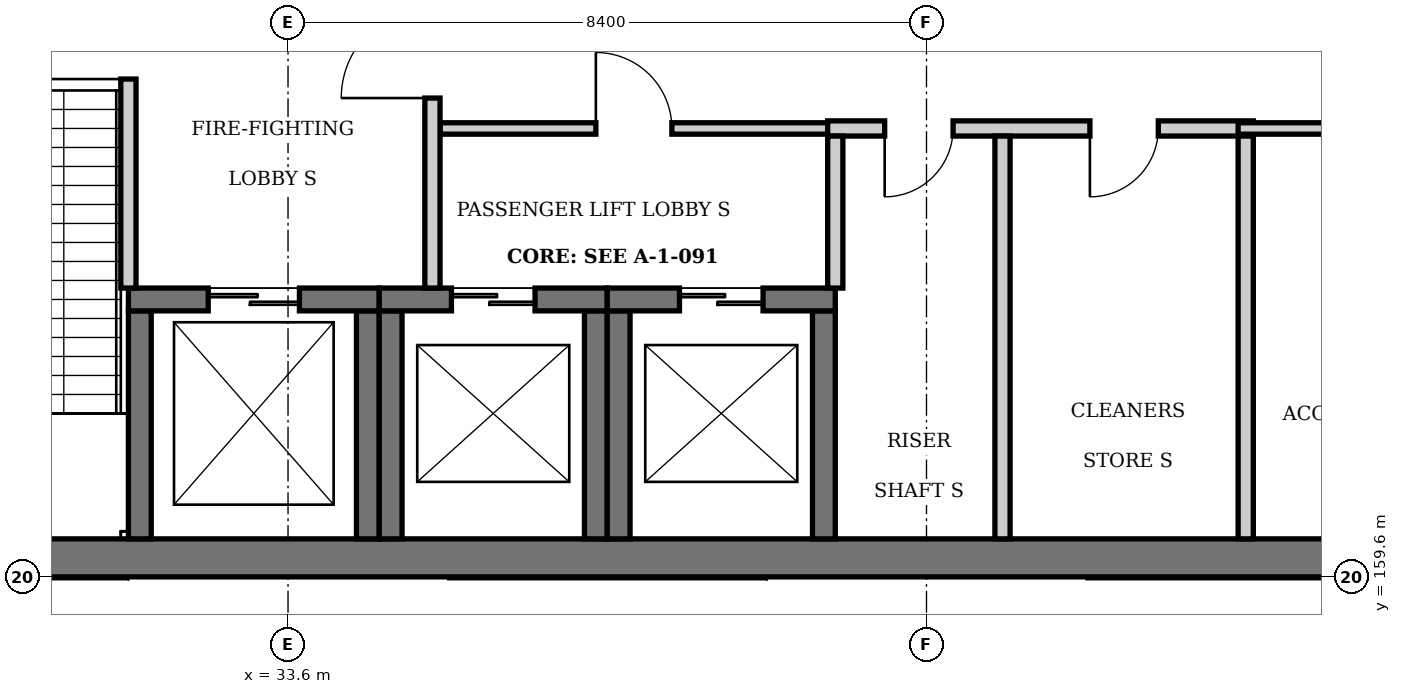
"""IFC4 building model, lengths in metres.
Left out: names, types, materials, properties, quantities, classifications, styles, units other than length and angle.
Written with IfcOpenShell. Run it as: python <this file> out.ifc"""

import sys

from ifc_helpers import new_model, si_unit, direction, frame, frame_2d, origin, place, context, subcontext, project, spatial, rectangle, extrude, element, fill, save


model = new_model("IFC4")
c1 = context("Model", 3, precision=1e-05, world=origin(), true_north=direction((0.0, 1.0)))
c2 = subcontext(c1, "Body", "Model", "MODEL_VIEW")
j1 = project(units=[si_unit("LENGTHUNIT", "METRE"), si_unit("PLANEANGLEUNIT", "RADIAN")], contexts=[c1])
p1 = place(None, origin())
s1 = spatial("IfcSite", under=j1, at=p1, CompositionType="ELEMENT")
p2 = place(p1, origin())
s2 = spatial("IfcBuilding", under=s1, at=p2, CompositionType="ELEMENT")
p3 = place(p2, origin())
s3 = spatial("IfcBuildingStorey", under=s2, at=p3, CompositionType="ELEMENT", Elevation=0.0)
p4 = place(p3, frame((25.35, 159.85, -0.7), z_axis=(0.0, 0.0, 1.0), x_axis=(1.0, 0.0, 0.0)))
e1 = element("IfcWall", 1, at=p4, inside=s3, PredefinedType="SHEAR", context=c2, shape_type="SweptSolid", body=[
    extrude(rectangle(XDim=25.043, YDim=0.5, at=frame_2d((12.521, 0.0))), origin(), (0.0, 0.0, 1.0), 6.7),
])
p5 = place(p4, frame((3.3, 0.0, 0.7)))
e2 = element("IfcOpeningElement", 2, at=p5, cuts=e1, PredefinedType="OPENING", context=c2, shape_type="SweptSolid", body=[
    extrude(rectangle(XDim=1.5, YDim=2.4, at=frame_2d((0.75, 1.2))), frame((0.0, 0.26, 0.0), z_axis=(0.0, -1.0, 0.0), x_axis=(1.0, 0.0, 0.0)), (0.0, 0.0, 1.0), 0.52),
])
for number, where, z_axis, x_axis in (
    (3, (34.65, 160.1, -1.8), (0.0, 0.0, 1.0), (0.0, 1.0, 0.0)),
    (4, (31.65, 160.1, -1.8), (0.0, 0.0, 1.0), (0.0, 1.0, 0.0)),
):
    element("IfcWall", number, at=place(p3, frame(where, z_axis=z_axis, x_axis=x_axis)), inside=s3, PredefinedType="SHEAR", context=c2, shape_type="SweptSolid", body=[
        extrude(rectangle(XDim=3.0, YDim=0.3, at=frame_2d((1.5, 0.0))), origin(), (0.0, 0.0, 1.0), 7.8),
    ])
p6 = place(p3, frame((31.5, 163.25, -1.8), z_axis=(0.0, 0.0, 1.0), x_axis=(1.0, 0.0, 0.0)))
e5 = element("IfcWall", 5, at=p6, inside=s3, PredefinedType="SHEAR", context=c2, shape_type="SweptSolid", body=[
    extrude(rectangle(XDim=3.3, YDim=0.3, at=frame_2d((1.65, 0.0))), origin(), (0.0, 0.0, 1.0), 7.8),
])
p7 = place(p6, frame((1.05, 0.0, 1.8)))
e6 = element("IfcOpeningElement", 6, at=p7, cuts=e5, PredefinedType="OPENING", context=c2, shape_type="SweptSolid", body=[
    extrude(rectangle(XDim=1.2, YDim=2.1, at=frame_2d((0.6, 1.05))), frame((0.0, 0.16, 0.0), z_axis=(0.0, -1.0, 0.0), x_axis=(1.0, 0.0, 0.0)), (0.0, 0.0, 1.0), 0.32),
])
for number, where, z_axis, x_axis in (
    (7, (37.65, 160.1, -1.8), (0.0, 0.0, 1.0), (0.0, 1.0, 0.0)),
    (8, (34.95, 160.1, -1.8), (0.0, 0.0, 1.0), (0.0, 1.0, 0.0)),
):
    element("IfcWall", number, at=place(p3, frame(where, z_axis=z_axis, x_axis=x_axis)), inside=s3, PredefinedType="SHEAR", context=c2, shape_type="SweptSolid", body=[
        extrude(rectangle(XDim=3.0, YDim=0.3, at=frame_2d((1.5, 0.0))), origin(), (0.0, 0.0, 1.0), 7.8),
    ])
p8 = place(p3, frame((34.8, 163.25, -1.8), z_axis=(0.0, 0.0, 1.0), x_axis=(1.0, 0.0, 0.0)))
e9 = element("IfcWall", 9, at=p8, inside=s3, PredefinedType="SHEAR", context=c2, shape_type="SweptSolid", body=[
    extrude(rectangle(XDim=3.0, YDim=0.3, at=frame_2d((1.5, 0.0))), origin(), (0.0, 0.0, 1.0), 7.8),
])
p9 = place(p8, frame((0.95, 0.0, 1.8)))
e10 = element("IfcOpeningElement", 10, at=p9, cuts=e9, PredefinedType="OPENING", context=c2, shape_type="SweptSolid", body=[
    extrude(rectangle(XDim=1.1, YDim=2.1, at=frame_2d((0.55, 1.05))), frame((0.0, 0.16, 0.0), z_axis=(0.0, -1.0, 0.0), x_axis=(1.0, 0.0, 0.0)), (0.0, 0.0, 1.0), 0.32),
])
for number, where, z_axis, x_axis in (
    (11, (40.65, 160.1, -1.8), (0.0, 0.0, 1.0), (0.0, 1.0, 0.0)),
    (12, (37.95, 160.1, -1.8), (0.0, 0.0, 1.0), (0.0, 1.0, 0.0)),
):
    element("IfcWall", number, at=place(p3, frame(where, z_axis=z_axis, x_axis=x_axis)), inside=s3, PredefinedType="SHEAR", context=c2, shape_type="SweptSolid", body=[
        extrude(rectangle(XDim=3.0, YDim=0.3, at=frame_2d((1.5, 0.0))), origin(), (0.0, 0.0, 1.0), 7.8),
    ])
p10 = place(p3, frame((37.8, 163.25, -1.8), z_axis=(0.0, 0.0, 1.0), x_axis=(1.0, 0.0, 0.0)))
e13 = element("IfcWall", 13, at=p10, inside=s3, PredefinedType="SHEAR", context=c2, shape_type="SweptSolid", body=[
    extrude(rectangle(XDim=3.0, YDim=0.3, at=frame_2d((1.5, 0.0))), origin(), (0.0, 0.0, 1.0), 7.8),
])
p11 = place(p10, frame((0.95, 0.0, 1.8)))
e14 = element("IfcOpeningElement", 14, at=p11, cuts=e13, PredefinedType="OPENING", context=c2, shape_type="SweptSolid", body=[
    extrude(rectangle(XDim=1.1, YDim=2.1, at=frame_2d((0.55, 1.05))), frame((0.0, 0.16, 0.0), z_axis=(0.0, -1.0, 0.0), x_axis=(1.0, 0.0, 0.0)), (0.0, 0.0, 1.0), 0.32),
])
p12 = place(p3, frame((35.6, 165.5, 0.0), z_axis=(0.0, 0.0, 1.0), x_axis=(1.0, 0.0, 0.0)))
e15 = element("IfcWall", 15, at=p12, inside=s3, PredefinedType="PARTITIONING", context=c2, shape_type="SweptSolid", body=[
    extrude(rectangle(XDim=5.3, YDim=0.15, at=frame_2d((2.65, 0.0))), origin(), (0.0, 0.0, 1.0), 5.8),
])
p13 = place(p12, frame((2.05, 0.0, 0.0)))
e16 = element("IfcOpeningElement", 16, at=p13, cuts=e15, PredefinedType="OPENING", context=c2, shape_type="SweptSolid", body=[
    extrude(rectangle(XDim=1.0, YDim=2.1, at=frame_2d((0.5, 1.05))), frame((0.0, 0.085, 0.0), z_axis=(0.0, -1.0, 0.0), x_axis=(1.0, 0.0, 0.0)), (0.0, 0.0, 1.0), 0.17),
])
p14 = place(p3, frame((40.7, 165.5, 0.0), z_axis=(0.0, 0.0, 1.0), x_axis=(1.0, 0.0, 0.0)))
e17 = element("IfcWall", 17, at=p14, inside=s3, PredefinedType="PARTITIONING", context=c2, shape_type="SweptSolid", body=[
    extrude(rectangle(XDim=5.6, YDim=0.2, at=frame_2d((2.8, 0.0))), origin(), (0.0, 0.0, 1.0), 5.8),
])
p15 = place(p14, frame((0.75, 0.0, 0.0)))
e18 = element("IfcOpeningElement", 18, at=p15, cuts=e17, PredefinedType="OPENING", context=c2, shape_type="SweptSolid", body=[
    extrude(rectangle(XDim=0.9, YDim=2.1, at=frame_2d((0.45, 1.05))), frame((0.0, 0.11, 0.0), z_axis=(0.0, -1.0, 0.0), x_axis=(1.0, 0.0, 0.0)), (0.0, 0.0, 1.0), 0.22),
])
p16 = place(p14, frame((3.45, 0.0, 0.0)))
e19 = element("IfcOpeningElement", 19, at=p16, cuts=e17, PredefinedType="OPENING", context=c2, shape_type="SweptSolid", body=[
    extrude(rectangle(XDim=0.9, YDim=2.1, at=frame_2d((0.45, 1.05))), frame((0.0, 0.11, 0.0), z_axis=(0.0, -1.0, 0.0), x_axis=(1.0, 0.0, 0.0)), (0.0, 0.0, 1.0), 0.22),
])
p17 = place(p3, frame((46.1, 165.5, 0.0), z_axis=(0.0, 0.0, 1.0), x_axis=(1.0, 0.0, 0.0)))
e20 = element("IfcWall", 20, at=p17, inside=s3, PredefinedType="PARTITIONING", context=c2, shape_type="SweptSolid", body=[
    extrude(rectangle(XDim=3.4, YDim=0.15, at=frame_2d((1.7, 0.0))), origin(), (0.0, 0.0, 1.0), 5.8),
])
p18 = place(p17, frame((1.25, 0.0, 0.0)))
e21 = element("IfcOpeningElement", 21, at=p18, cuts=e20, PredefinedType="OPENING", context=c2, shape_type="SweptSolid", body=[
    extrude(rectangle(XDim=1.0, YDim=2.1, at=frame_2d((0.5, 1.05))), frame((0.0, 0.085, 0.0), z_axis=(0.0, -1.0, 0.0), x_axis=(1.0, 0.0, 0.0)), (0.0, 0.0, 1.0), 0.17),
])
p19 = place(p3, frame((31.5, 163.4, 0.0), z_axis=(0.0, 0.0, 1.0), x_axis=(0.0, 1.0, 0.0)))
e22 = element("IfcWall", 22, at=p19, inside=s3, PredefinedType="PARTITIONING", context=c2, shape_type="SweptSolid", body=[
    extrude(rectangle(XDim=4.1, YDim=0.2, at=frame_2d((2.05, 0.0))), origin(), (0.0, 0.0, 1.0), 5.8),
])
p20 = place(p19, frame((2.75, 0.0, 0.0)))
e23 = element("IfcOpeningElement", 23, at=p20, cuts=e22, PredefinedType="OPENING", context=c2, shape_type="SweptSolid", body=[
    extrude(rectangle(XDim=1.1, YDim=2.4, at=frame_2d((0.55, 1.2))), frame((0.0, 0.11, 0.0), z_axis=(0.0, -1.0, 0.0), x_axis=(1.0, 0.0, 0.0)), (0.0, 0.0, 1.0), 0.22),
])
p21 = place(p3, frame((35.5, 163.4, 0.0), z_axis=(0.0, 0.0, 1.0), x_axis=(0.0, 1.0, 0.0)))
e24 = element("IfcWall", 24, at=p21, inside=s3, PredefinedType="PARTITIONING", context=c2, shape_type="SweptSolid", body=[
    extrude(rectangle(XDim=4.1, YDim=0.2, at=frame_2d((2.05, 0.0))), origin(), (0.0, 0.0, 1.0), 5.8),
])
p22 = place(p21, frame((2.5, 0.0, 0.0)))
e25 = element("IfcOpeningElement", 25, at=p22, cuts=e24, PredefinedType="OPENING", context=c2, shape_type="SweptSolid", body=[
    extrude(rectangle(XDim=1.2, YDim=2.4, at=frame_2d((0.6, 1.2))), frame((0.0, 0.11, 0.0), z_axis=(0.0, -1.0, 0.0), x_axis=(1.0, 0.0, 0.0)), (0.0, 0.0, 1.0), 0.22),
])
p23 = place(p3, frame((40.8, 163.4, 0.0), z_axis=(0.0, 0.0, 1.0), x_axis=(0.0, 1.0, 0.0)))
e26 = element("IfcWall", 26, at=p23, inside=s3, PredefinedType="PARTITIONING", context=c2, shape_type="SweptSolid", body=[
    extrude(rectangle(XDim=2.0, YDim=0.2, at=frame_2d((1.0, 0.0))), origin(), (0.0, 0.0, 1.0), 5.8),
])
for number, where, z_axis, x_axis in (
    (27, (43.0, 160.1, 0.0), (0.0, 0.0, 1.0), (0.0, 1.0, 0.0)),
    (28, (46.2, 160.1, 0.0), (0.0, 0.0, 1.0), (0.0, 1.0, 0.0)),
):
    element("IfcWall", number, at=place(p3, frame(where, z_axis=z_axis, x_axis=x_axis)), inside=s3, PredefinedType="PARTITIONING", context=c2, shape_type="SweptSolid", body=[
        extrude(rectangle(XDim=5.3, YDim=0.2, at=frame_2d((2.65, 0.0))), origin(), (0.0, 0.0, 1.0), 5.8),
    ])
p24 = place(p13, origin())
e29 = element("IfcDoor", 29, at=p24, inside=s3, OperationType="SINGLE_SWING_LEFT", PredefinedType="DOOR", context=c2, shape_type="SweptSolid", body=[
    extrude(rectangle(XDim=1.0, YDim=2.1, at=frame_2d((0.5, 1.05))), frame((0.0, 0.025, 0.0), z_axis=(0.0, -1.0, 0.0), x_axis=(1.0, 0.0, 0.0)), (0.0, 0.0, 1.0), 0.05),
])
fill(e16, e29)
p25 = place(p22, origin())
e30 = element("IfcDoor", 30, at=p25, inside=s3, OperationType="SINGLE_SWING_LEFT", PredefinedType="DOOR", context=c2, shape_type="SweptSolid", body=[
    extrude(rectangle(XDim=1.2, YDim=2.4, at=frame_2d((0.6, 1.2))), frame((0.0, 0.025, 0.0), z_axis=(0.0, -1.0, 0.0), x_axis=(1.0, 0.0, 0.0)), (0.0, 0.0, 1.0), 0.05),
])
fill(e25, e30)
p26 = place(p15, frame((0.9, 0.0, 0.0), z_axis=(0.0, 0.0, 1.0), x_axis=(-1.0, 0.0, 0.0)))
e31 = element("IfcDoor", 31, at=p26, inside=s3, OperationType="SINGLE_SWING_RIGHT", PredefinedType="DOOR", context=c2, shape_type="SweptSolid", body=[
    extrude(rectangle(XDim=0.9, YDim=2.1, at=frame_2d((0.45, 1.05))), frame((0.0, 0.025, 0.0), z_axis=(0.0, -1.0, 0.0), x_axis=(1.0, 0.0, 0.0)), (0.0, 0.0, 1.0), 0.05),
])
fill(e18, e31)
p27 = place(p16, frame((0.9, 0.0, 0.0), z_axis=(0.0, 0.0, 1.0), x_axis=(-1.0, 0.0, 0.0)))
e32 = element("IfcDoor", 32, at=p27, inside=s3, OperationType="SINGLE_SWING_RIGHT", PredefinedType="DOOR", context=c2, shape_type="SweptSolid", body=[
    extrude(rectangle(XDim=0.9, YDim=2.1, at=frame_2d((0.45, 1.05))), frame((0.0, 0.025, 0.0), z_axis=(0.0, -1.0, 0.0), x_axis=(1.0, 0.0, 0.0)), (0.0, 0.0, 1.0), 0.05),
])
fill(e19, e32)
p28 = place(p20, origin())
e33 = element("IfcDoor", 33, at=p28, inside=s3, OperationType="SINGLE_SWING_LEFT", PredefinedType="DOOR", context=c2, shape_type="SweptSolid", body=[
    extrude(rectangle(XDim=1.1, YDim=2.4, at=frame_2d((0.55, 1.2))), frame((0.0, 0.025, 0.0), z_axis=(0.0, -1.0, 0.0), x_axis=(1.0, 0.0, 0.0)), (0.0, 0.0, 1.0), 0.05),
])
fill(e23, e33)
p29 = place(p7, origin())
e34 = element("IfcDoor", 34, at=p29, inside=s3, OperationType="SLIDING_TO_LEFT", PredefinedType="DOOR", context=c2, shape_type="SweptSolid", body=[
    extrude(rectangle(XDim=1.2, YDim=2.1, at=frame_2d((0.6, 1.05))), frame((0.0, 0.025, 0.0), z_axis=(0.0, -1.0, 0.0), x_axis=(1.0, 0.0, 0.0)), (0.0, 0.0, 1.0), 0.05),
])
fill(e6, e34)
p30 = place(p9, origin())
e35 = element("IfcDoor", 35, at=p30, inside=s3, OperationType="SLIDING_TO_LEFT", PredefinedType="DOOR", context=c2, shape_type="SweptSolid", body=[
    extrude(rectangle(XDim=1.1, YDim=2.1, at=frame_2d((0.55, 1.05))), frame((0.0, 0.025, 0.0), z_axis=(0.0, -1.0, 0.0), x_axis=(1.0, 0.0, 0.0)), (0.0, 0.0, 1.0), 0.05),
])
fill(e10, e35)
p31 = place(p11, origin())
e36 = element("IfcDoor", 36, at=p31, inside=s3, OperationType="SLIDING_TO_LEFT", PredefinedType="DOOR", context=c2, shape_type="SweptSolid", body=[
    extrude(rectangle(XDim=1.1, YDim=2.1, at=frame_2d((0.55, 1.05))), frame((0.0, 0.025, 0.0), z_axis=(0.0, -1.0, 0.0), x_axis=(1.0, 0.0, 0.0)), (0.0, 0.0, 1.0), 0.05),
])
fill(e14, e36)
save(model, sys.argv[1])
